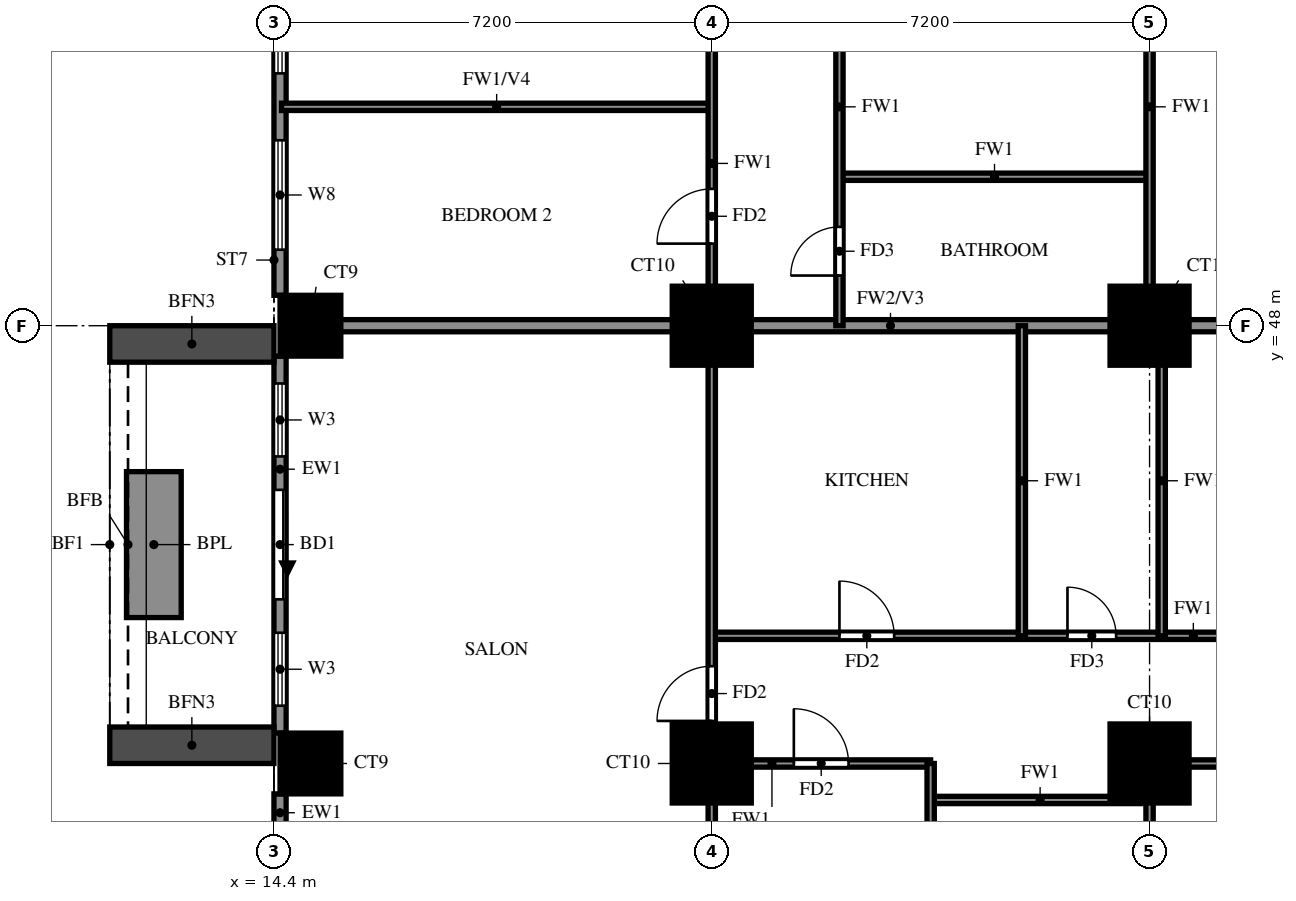
"""IFC4 building model, lengths in metres.
Left out: names, types, materials, properties, quantities, classifications, styles, units other than length and angle.
Written with IfcOpenShell. Run it as: python <this file> out.ifc"""

import sys

from ifc_helpers import new_model, si_unit, direction, frame, frame_2d, origin, origin_2d, place, context, subcontext, project, spatial, rectangle, extrude, source, transform, mapped, element, fill, save


model = new_model("IFC4")
c1 = context("Model", 3, precision=1e-05, world=origin(), true_north=direction((0.0, 1.0)))
c2 = subcontext(c1, "Body", "Model", "MODEL_VIEW")
j1 = project(units=[si_unit("LENGTHUNIT", "METRE"), si_unit("PLANEANGLEUNIT", "RADIAN")], contexts=[c1])
p1 = place(None, origin())
s1 = spatial("IfcSite", under=j1, at=p1, CompositionType="ELEMENT")
p2 = place(p1, origin())
s2 = spatial("IfcBuilding", under=s1, at=p2, CompositionType="ELEMENT")
p3 = place(p2, frame((0.0, 0.0, 90.0)))
s3 = spatial("IfcBuildingStorey", under=s2, at=p3, CompositionType="ELEMENT", Elevation=90.0)
m1 = source(origin(), c2, "Body", "SweptSolid", [
    extrude(rectangle(XDim=1.0, YDim=1.0, at=origin_2d()), origin(), (0.0, 0.0, 1.0), 3.18),
])
p4 = place(p3, frame((15.0, 40.8, 0.0), z_axis=(0.0, 0.0, 1.0), x_axis=(1.0, 0.0, 0.0)))
e1 = element("IfcColumn", 1, at=p4, inside=s3, PredefinedType="COLUMN", context=c2, shape_type="MappedRepresentation", body=[
    mapped(m1, transform((0.0, 0.0, 0.0))),
])
m2 = source(origin(), c2, "Body", "SweptSolid", [
    extrude(rectangle(XDim=1.3, YDim=1.3, at=origin_2d()), origin(), (0.0, 0.0, 1.0), 3.18),
])
for number, where, z_axis, x_axis in (
    (2, (21.6, 40.8, 0.0), (0.0, 0.0, 1.0), (1.0, 0.0, 0.0)),
    (3, (28.8, 40.8, 0.0), (0.0, 0.0, 1.0), (1.0, 0.0, 0.0)),
):
    element("IfcColumn", number, at=place(p3, frame(where, z_axis=z_axis, x_axis=x_axis)), inside=s3, PredefinedType="COLUMN", context=c2, shape_type="MappedRepresentation", body=[
        mapped(m2, transform((0.0, 0.0, 0.0))),
    ])
p5 = place(p3, frame((15.0, 48.0, 0.0), z_axis=(0.0, 0.0, 1.0), x_axis=(1.0, 0.0, 0.0)))
e4 = element("IfcColumn", 4, at=p5, inside=s3, PredefinedType="COLUMN", context=c2, shape_type="MappedRepresentation", body=[
    mapped(m1, transform((0.0, 0.0, 0.0))),
])
for number, where, z_axis, x_axis in (
    (5, (21.6, 48.0, 0.0), (0.0, 0.0, 1.0), (1.0, 0.0, 0.0)),
    (6, (28.8, 48.0, 0.0), (0.0, 0.0, 1.0), (1.0, 0.0, 0.0)),
):
    element("IfcColumn", number, at=place(p3, frame(where, z_axis=z_axis, x_axis=x_axis)), inside=s3, PredefinedType="COLUMN", context=c2, shape_type="MappedRepresentation", body=[
        mapped(m2, transform((0.0, 0.0, 0.0))),
    ])
p6 = place(p3, frame((14.5, 54.7, 0.0), z_axis=(0.0, 0.0, 1.0), x_axis=(0.0, -1.0, 0.0)))
e7 = element("IfcWall", 7, at=p6, inside=s3, PredefinedType="SOLIDWALL", context=c2, shape_type="SweptSolid", body=[
    extrude(rectangle(XDim=6.2, YDim=0.2, at=frame_2d((3.1, 0.0))), origin(), (0.0, 0.0, 1.0), 3.18),
])
p7 = place(p6, frame((3.65, 0.0, 0.6)))
e8 = element("IfcOpeningElement", 8, at=p7, cuts=e7, PredefinedType="OPENING", context=c2, shape_type="SweptSolid", body=[
    extrude(rectangle(XDim=1.8, YDim=2.4, at=frame_2d((0.9, 1.2))), frame((0.0, 0.11, 0.0), z_axis=(0.0, -1.0, 0.0), x_axis=(1.0, 0.0, 0.0)), (0.0, 0.0, 1.0), 0.22),
])
p8 = place(p6, frame((0.75, 0.0, 0.6)))
e9 = element("IfcOpeningElement", 9, at=p8, cuts=e7, PredefinedType="OPENING", context=c2, shape_type="SweptSolid", body=[
    extrude(rectangle(XDim=1.8, YDim=2.4, at=frame_2d((0.9, 1.2))), frame((0.0, 0.11, 0.0), z_axis=(0.0, -1.0, 0.0), x_axis=(1.0, 0.0, 0.0)), (0.0, 0.0, 1.0), 0.22),
])
p9 = place(p3, frame((14.5, 47.5, 0.0), z_axis=(0.0, 0.0, 1.0), x_axis=(0.0, -1.0, 0.0)))
e10 = element("IfcWall", 10, at=p9, inside=s3, PredefinedType="SOLIDWALL", context=c2, shape_type="SweptSolid", body=[
    extrude(rectangle(XDim=6.2, YDim=0.2, at=frame_2d((3.1, 0.0))), origin(), (0.0, 0.0, 1.0), 3.18),
])
p10 = place(p9, frame((2.2, 0.0, 0.0)))
e11 = element("IfcOpeningElement", 11, at=p10, cuts=e10, PredefinedType="OPENING", context=c2, shape_type="SweptSolid", body=[
    extrude(rectangle(XDim=1.8, YDim=2.4, at=frame_2d((0.9, 1.2))), frame((0.0, 0.11, 0.0), z_axis=(0.0, -1.0, 0.0), x_axis=(1.0, 0.0, 0.0)), (0.0, 0.0, 1.0), 0.22),
])
p11 = place(p9, frame((0.45, 0.0, 0.6)))
e12 = element("IfcOpeningElement", 12, at=p11, cuts=e10, PredefinedType="OPENING", context=c2, shape_type="SweptSolid", body=[
    extrude(rectangle(XDim=1.2, YDim=2.4, at=frame_2d((0.6, 1.2))), frame((0.0, 0.11, 0.0), z_axis=(0.0, -1.0, 0.0), x_axis=(1.0, 0.0, 0.0)), (0.0, 0.0, 1.0), 0.22),
])
p12 = place(p9, frame((4.55, 0.0, 0.6)))
e13 = element("IfcOpeningElement", 13, at=p12, cuts=e10, PredefinedType="OPENING", context=c2, shape_type="SweptSolid", body=[
    extrude(rectangle(XDim=1.2, YDim=2.4, at=frame_2d((0.6, 1.2))), frame((0.0, 0.11, 0.0), z_axis=(0.0, -1.0, 0.0), x_axis=(1.0, 0.0, 0.0)), (0.0, 0.0, 1.0), 0.22),
])
p13 = place(p3, frame((14.5, 40.3, 0.0), z_axis=(0.0, 0.0, 1.0), x_axis=(0.0, -1.0, 0.0)))
e14 = element("IfcWall", 14, at=p13, inside=s3, PredefinedType="SOLIDWALL", context=c2, shape_type="SweptSolid", body=[
    extrude(rectangle(XDim=3.1, YDim=0.2, at=frame_2d((1.55, 0.0))), origin(), (0.0, 0.0, 1.0), 3.18),
])
p14 = place(p13, frame((0.65, 0.0, 0.6)))
e15 = element("IfcOpeningElement", 15, at=p14, cuts=e14, PredefinedType="OPENING", context=c2, shape_type="SweptSolid", body=[
    extrude(rectangle(XDim=1.8, YDim=2.4, at=frame_2d((0.9, 1.2))), frame((0.0, 0.11, 0.0), z_axis=(0.0, -1.0, 0.0), x_axis=(1.0, 0.0, 0.0)), (0.0, 0.0, 1.0), 0.22),
])
for number, where, z_axis, x_axis in (
    (16, (14.4, 47.7, 0.0), (0.0, 0.0, 1.0), (-1.0, 0.0, 0.0)),
    (17, (14.4, 41.1, 0.0), (0.0, 0.0, 1.0), (-1.0, 0.0, 0.0)),
):
    element("IfcWall", number, at=place(p3, frame(where, z_axis=z_axis, x_axis=x_axis)), inside=s3, PredefinedType="SOLIDWALL", context=c2, shape_type="SweptSolid", body=[
        extrude(rectangle(XDim=2.7, YDim=0.6, at=frame_2d((1.35, 0.0))), origin(), (0.0, 0.0, 1.0), 2.85),
    ])
p15 = place(p3, frame((12.425, 45.6, 0.0), z_axis=(0.0, 0.0, 1.0), x_axis=(0.0, -1.0, 0.0)))
e18 = element("IfcWall", 18, at=p15, inside=s3, PredefinedType="SOLIDWALL", context=c2, shape_type="SweptSolid", body=[
    extrude(rectangle(XDim=2.4, YDim=0.9, at=frame_2d((1.2, 0.0))), origin(), (0.0, 0.0, 1.0), 0.9),
])
p16 = place(p3, frame((14.525, 48.0, 0.0), z_axis=(0.0, 0.0, 1.0), x_axis=(1.0, 0.0, 0.0)))
e19 = element("IfcWall", 19, at=p16, inside=s3, PredefinedType="SOLIDWALL", context=c2, shape_type="SweptSolid", body=[
    extrude(rectangle(XDim=19.075, YDim=0.2, at=frame_2d((9.538, 0.0))), origin(), (0.0, 0.0, 1.0), 3.18),
])
p17 = place(p3, frame((25.2, 40.2, 0.0), z_axis=(0.0, 0.0, 1.0), x_axis=(1.0, 0.0, 0.0)))
e20 = element("IfcWall", 20, at=p17, inside=s3, PredefinedType="PARTITIONING", context=c2, shape_type="SweptSolid", body=[
    extrude(rectangle(XDim=3.6, YDim=0.12, at=frame_2d((1.8, 0.0))), origin(), (0.0, 0.0, 1.0), 3.18),
])
p18 = place(p3, frame((21.6, 40.8, 0.0), z_axis=(0.0, 0.0, 1.0), x_axis=(1.0, 0.0, 0.0)))
e21 = element("IfcWall", 21, at=p18, inside=s3, PredefinedType="PARTITIONING", context=c2, shape_type="SweptSolid", body=[
    extrude(rectangle(XDim=3.6, YDim=0.12, at=frame_2d((1.8, 0.0))), origin(), (0.0, 0.0, 1.0), 3.18),
])
p19 = place(p18, frame((1.35, 0.0, 0.0)))
e22 = element("IfcOpeningElement", 22, at=p19, cuts=e21, PredefinedType="OPENING", context=c2, shape_type="SweptSolid", body=[
    extrude(rectangle(XDim=0.9, YDim=2.1, at=frame_2d((0.45, 1.05))), frame((0.0, 0.07, 0.0), z_axis=(0.0, -1.0, 0.0), x_axis=(1.0, 0.0, 0.0)), (0.0, 0.0, 1.0), 0.14),
])
p20 = place(p3, frame((28.8, 40.8, 0.0), z_axis=(0.0, 0.0, 1.0), x_axis=(1.0, 0.0, 0.0)))
e23 = element("IfcWall", 23, at=p20, inside=s3, PredefinedType="PARTITIONING", context=c2, shape_type="SweptSolid", body=[
    extrude(rectangle(XDim=12.0, YDim=0.12, at=frame_2d((6.0, 0.0))), origin(), (0.0, 0.0, 1.0), 3.18),
])
p21 = place(p20, frame((1.35, 0.0, 0.0)))
e24 = element("IfcOpeningElement", 24, at=p21, cuts=e23, PredefinedType="OPENING", context=c2, shape_type="SweptSolid", body=[
    extrude(rectangle(XDim=0.9, YDim=2.1, at=frame_2d((0.45, 1.05))), frame((0.0, 0.07, 0.0), z_axis=(0.0, -1.0, 0.0), x_axis=(1.0, 0.0, 0.0)), (0.0, 0.0, 1.0), 0.14),
])
p22 = place(p20, frame((4.95, 0.0, 0.0)))
e25 = element("IfcOpeningElement", 25, at=p22, cuts=e23, PredefinedType="OPENING", context=c2, shape_type="SweptSolid", body=[
    extrude(rectangle(XDim=0.9, YDim=2.1, at=frame_2d((0.45, 1.05))), frame((0.0, 0.07, 0.0), z_axis=(0.0, -1.0, 0.0), x_axis=(1.0, 0.0, 0.0)), (0.0, 0.0, 1.0), 0.14),
])
p23 = place(p20, frame((9.15, 0.0, 0.0)))
e26 = element("IfcOpeningElement", 26, at=p23, cuts=e23, PredefinedType="OPENING", context=c2, shape_type="SweptSolid", body=[
    extrude(rectangle(XDim=0.9, YDim=2.1, at=frame_2d((0.45, 1.05))), frame((0.0, 0.07, 0.0), z_axis=(0.0, -1.0, 0.0), x_axis=(1.0, 0.0, 0.0)), (0.0, 0.0, 1.0), 0.14),
])
p24 = place(p3, frame((21.6, 42.9, 0.0), z_axis=(0.0, 0.0, 1.0), x_axis=(1.0, 0.0, 0.0)))
e27 = element("IfcWall", 27, at=p24, inside=s3, PredefinedType="PARTITIONING", context=c2, shape_type="SweptSolid", body=[
    extrude(rectangle(XDim=14.4, YDim=0.12, at=frame_2d((7.2, 0.0))), origin(), (0.0, 0.0, 1.0), 3.18),
])
p25 = place(p24, frame((2.1, 0.0, 0.0)))
e28 = element("IfcOpeningElement", 28, at=p25, cuts=e27, PredefinedType="OPENING", context=c2, shape_type="SweptSolid", body=[
    extrude(rectangle(XDim=0.9, YDim=2.1, at=frame_2d((0.45, 1.05))), frame((0.0, 0.07, 0.0), z_axis=(0.0, -1.0, 0.0), x_axis=(1.0, 0.0, 0.0)), (0.0, 0.0, 1.0), 0.14),
])
p26 = place(p24, frame((5.85, 0.0, 0.0)))
e29 = element("IfcOpeningElement", 29, at=p26, cuts=e27, PredefinedType="OPENING", context=c2, shape_type="SweptSolid", body=[
    extrude(rectangle(XDim=0.8, YDim=2.1, at=frame_2d((0.4, 1.05))), frame((0.0, 0.07, 0.0), z_axis=(0.0, -1.0, 0.0), x_axis=(1.0, 0.0, 0.0)), (0.0, 0.0, 1.0), 0.14),
])
p27 = place(p24, frame((9.25, 0.0, 0.0)))
e30 = element("IfcOpeningElement", 30, at=p27, cuts=e27, PredefinedType="OPENING", context=c2, shape_type="SweptSolid", body=[
    extrude(rectangle(XDim=0.9, YDim=2.1, at=frame_2d((0.45, 1.05))), frame((0.0, 0.07, 0.0), z_axis=(0.0, -1.0, 0.0), x_axis=(1.0, 0.0, 0.0)), (0.0, 0.0, 1.0), 0.14),
])
p28 = place(p3, frame((23.7, 50.45, 0.0), z_axis=(0.0, 0.0, 1.0), x_axis=(1.0, 0.0, 0.0)))
e31 = element("IfcWall", 31, at=p28, inside=s3, PredefinedType="PARTITIONING", context=c2, shape_type="SweptSolid", body=[
    extrude(rectangle(XDim=5.1, YDim=0.12, at=frame_2d((2.55, 0.0))), origin(), (0.0, 0.0, 1.0), 3.18),
])
p29 = place(p3, frame((14.525, 51.6, 0.0), z_axis=(0.0, 0.0, 1.0), x_axis=(1.0, 0.0, 0.0)))
e32 = element("IfcWall", 32, at=p29, inside=s3, PredefinedType="PARTITIONING", context=c2, shape_type="SweptSolid", body=[
    extrude(rectangle(XDim=7.075, YDim=0.12, at=frame_2d((3.538, 0.0))), origin(), (0.0, 0.0, 1.0), 2.28),
])
p30 = place(p3, frame((21.6, 33.725, 0.0), z_axis=(0.0, 0.0, 1.0), x_axis=(0.0, 1.0, 0.0)))
e33 = element("IfcWall", 33, at=p30, inside=s3, PredefinedType="PARTITIONING", context=c2, shape_type="SweptSolid", body=[
    extrude(rectangle(XDim=32.275, YDim=0.12, at=frame_2d((16.137, 0.0))), origin(), (0.0, 0.0, 1.0), 3.18),
])
p31 = place(p30, frame((7.775, 0.0, 0.0)))
e34 = element("IfcOpeningElement", 34, at=p31, cuts=e33, PredefinedType="OPENING", context=c2, shape_type="SweptSolid", body=[
    extrude(rectangle(XDim=0.9, YDim=2.1, at=frame_2d((0.45, 1.05))), frame((0.0, 0.07, 0.0), z_axis=(0.0, -1.0, 0.0), x_axis=(1.0, 0.0, 0.0)), (0.0, 0.0, 1.0), 0.14),
])
p32 = place(p30, frame((15.625, 0.0, 0.0)))
e35 = element("IfcOpeningElement", 35, at=p32, cuts=e33, PredefinedType="OPENING", context=c2, shape_type="SweptSolid", body=[
    extrude(rectangle(XDim=0.9, YDim=2.1, at=frame_2d((0.45, 1.05))), frame((0.0, 0.07, 0.0), z_axis=(0.0, -1.0, 0.0), x_axis=(1.0, 0.0, 0.0)), (0.0, 0.0, 1.0), 0.14),
])
p33 = place(p30, frame((22.225, 0.0, 0.0)))
e36 = element("IfcOpeningElement", 36, at=p33, cuts=e33, PredefinedType="OPENING", context=c2, shape_type="SweptSolid", body=[
    extrude(rectangle(XDim=1.5, YDim=2.1, at=frame_2d((0.75, 1.05))), frame((0.0, 0.07, 0.0), z_axis=(0.0, -1.0, 0.0), x_axis=(1.0, 0.0, 0.0)), (0.0, 0.0, 1.0), 0.14),
])
p34 = place(p30, frame((26.425, 0.0, 0.0)))
e37 = element("IfcOpeningElement", 37, at=p34, cuts=e33, PredefinedType="OPENING", context=c2, shape_type="SweptSolid", body=[
    extrude(rectangle(XDim=0.9, YDim=2.1, at=frame_2d((0.45, 1.05))), frame((0.0, 0.07, 0.0), z_axis=(0.0, -1.0, 0.0), x_axis=(1.0, 0.0, 0.0)), (0.0, 0.0, 1.0), 0.14),
])
p35 = place(p30, frame((30.025, 0.0, 0.0)))
e38 = element("IfcOpeningElement", 38, at=p35, cuts=e33, PredefinedType="OPENING", context=c2, shape_type="SweptSolid", body=[
    extrude(rectangle(XDim=0.9, YDim=2.1, at=frame_2d((0.45, 1.05))), frame((0.0, 0.07, 0.0), z_axis=(0.0, -1.0, 0.0), x_axis=(1.0, 0.0, 0.0)), (0.0, 0.0, 1.0), 0.14),
])
p36 = place(p3, frame((23.7, 48.0, 0.0), z_axis=(0.0, 0.0, 1.0), x_axis=(0.0, 1.0, 0.0)))
e39 = element("IfcWall", 39, at=p36, inside=s3, PredefinedType="PARTITIONING", context=c2, shape_type="SweptSolid", body=[
    extrude(rectangle(XDim=7.2, YDim=0.12, at=frame_2d((3.6, 0.0))), origin(), (0.0, 0.0, 1.0), 3.18),
])
p37 = place(p36, frame((0.825, 0.0, 0.0)))
e40 = element("IfcOpeningElement", 40, at=p37, cuts=e39, PredefinedType="OPENING", context=c2, shape_type="SweptSolid", body=[
    extrude(rectangle(XDim=0.8, YDim=2.1, at=frame_2d((0.4, 1.05))), frame((0.0, 0.07, 0.0), z_axis=(0.0, -1.0, 0.0), x_axis=(1.0, 0.0, 0.0)), (0.0, 0.0, 1.0), 0.14),
])
p38 = place(p3, frame((25.2, 33.725, 0.0), z_axis=(0.0, 0.0, 1.0), x_axis=(0.0, 1.0, 0.0)))
e41 = element("IfcWall", 41, at=p38, inside=s3, PredefinedType="PARTITIONING", context=c2, shape_type="SweptSolid", body=[
    extrude(rectangle(XDim=7.075, YDim=0.12, at=frame_2d((3.538, 0.0))), origin(), (0.0, 0.0, 1.0), 2.28),
])
p39 = place(p38, frame((2.837, 0.0, 0.0)))
e42 = element("IfcOpeningElement", 42, at=p39, cuts=e41, PredefinedType="OPENING", context=c2, shape_type="SweptSolid", body=[
    extrude(rectangle(XDim=0.8, YDim=2.1, at=frame_2d((0.4, 1.05))), frame((0.0, 0.07, 0.0), z_axis=(0.0, -1.0, 0.0), x_axis=(1.0, 0.0, 0.0)), (0.0, 0.0, 1.0), 0.14),
])
p40 = place(p3, frame((26.7, 42.9, 0.0), z_axis=(0.0, 0.0, 1.0), x_axis=(0.0, 1.0, 0.0)))
e43 = element("IfcWall", 43, at=p40, inside=s3, PredefinedType="PARTITIONING", context=c2, shape_type="SweptSolid", body=[
    extrude(rectangle(XDim=5.1, YDim=0.12, at=frame_2d((2.55, 0.0))), origin(), (0.0, 0.0, 1.0), 3.18),
])
p41 = place(p3, frame((28.8, 33.725, 0.0), z_axis=(0.0, 0.0, 1.0), x_axis=(0.0, 1.0, 0.0)))
e44 = element("IfcWall", 44, at=p41, inside=s3, PredefinedType="PARTITIONING", context=c2, shape_type="SweptSolid", body=[
    extrude(rectangle(XDim=7.075, YDim=0.12, at=frame_2d((3.538, 0.0))), origin(), (0.0, 0.0, 1.0), 3.18),
])
p42 = place(p3, frame((28.8, 48.0, 0.0), z_axis=(0.0, 0.0, 1.0), x_axis=(0.0, 1.0, 0.0)))
e45 = element("IfcWall", 45, at=p42, inside=s3, PredefinedType="PARTITIONING", context=c2, shape_type="SweptSolid", body=[
    extrude(rectangle(XDim=7.2, YDim=0.12, at=frame_2d((3.6, 0.0))), origin(), (0.0, 0.0, 1.0), 3.18),
])
p43 = place(p3, frame((29.0, 42.9, 0.0), z_axis=(0.0, 0.0, 1.0), x_axis=(0.0, 1.0, 0.0)))
e46 = element("IfcWall", 46, at=p43, inside=s3, PredefinedType="PARTITIONING", context=c2, shape_type="SweptSolid", body=[
    extrude(rectangle(XDim=5.1, YDim=0.12, at=frame_2d((2.55, 0.0))), origin(), (0.0, 0.0, 1.0), 3.18),
])
p44 = place(p7, origin())
e47 = element("IfcWindow", 47, at=p44, inside=s3, PartitioningType="DOUBLE_PANEL_VERTICAL", PredefinedType="WINDOW", context=c2, shape_type="SweptSolid", body=[
    extrude(rectangle(XDim=1.8, YDim=2.4, at=frame_2d((0.9, 1.2))), frame((0.0, 0.03, 0.0), z_axis=(0.0, -1.0, 0.0), x_axis=(1.0, 0.0, 0.0)), (0.0, 0.0, 1.0), 0.06),
])
fill(e8, e47)
p45 = place(p8, origin())
e48 = element("IfcWindow", 48, at=p45, inside=s3, PartitioningType="DOUBLE_PANEL_VERTICAL", PredefinedType="WINDOW", context=c2, shape_type="SweptSolid", body=[
    extrude(rectangle(XDim=1.8, YDim=2.4, at=frame_2d((0.9, 1.2))), frame((0.0, 0.03, 0.0), z_axis=(0.0, -1.0, 0.0), x_axis=(1.0, 0.0, 0.0)), (0.0, 0.0, 1.0), 0.06),
])
fill(e9, e48)
p46 = place(p10, origin())
e49 = element("IfcDoor", 49, at=p46, inside=s3, OperationType="DOUBLE_DOOR_SLIDING", PredefinedType="DOOR", context=c2, shape_type="SweptSolid", body=[
    extrude(rectangle(XDim=1.8, YDim=2.4, at=frame_2d((0.9, 1.2))), frame((0.0, 0.025, 0.0), z_axis=(0.0, -1.0, 0.0), x_axis=(1.0, 0.0, 0.0)), (0.0, 0.0, 1.0), 0.05),
])
fill(e11, e49)
p47 = place(p11, origin())
e50 = element("IfcWindow", 50, at=p47, inside=s3, PartitioningType="SINGLE_PANEL", PredefinedType="WINDOW", context=c2, shape_type="SweptSolid", body=[
    extrude(rectangle(XDim=1.2, YDim=2.4, at=frame_2d((0.6, 1.2))), frame((0.0, 0.03, 0.0), z_axis=(0.0, -1.0, 0.0), x_axis=(1.0, 0.0, 0.0)), (0.0, 0.0, 1.0), 0.06),
])
fill(e12, e50)
p48 = place(p12, origin())
e51 = element("IfcWindow", 51, at=p48, inside=s3, PartitioningType="SINGLE_PANEL", PredefinedType="WINDOW", context=c2, shape_type="SweptSolid", body=[
    extrude(rectangle(XDim=1.2, YDim=2.4, at=frame_2d((0.6, 1.2))), frame((0.0, 0.03, 0.0), z_axis=(0.0, -1.0, 0.0), x_axis=(1.0, 0.0, 0.0)), (0.0, 0.0, 1.0), 0.06),
])
fill(e13, e51)
p49 = place(p31, origin())
e52 = element("IfcDoor", 52, at=p49, inside=s3, OperationType="SINGLE_SWING_LEFT", PredefinedType="DOOR", context=c2, shape_type="SweptSolid", body=[
    extrude(rectangle(XDim=0.9, YDim=2.1, at=frame_2d((0.45, 1.05))), frame((0.0, 0.025, 0.0), z_axis=(0.0, -1.0, 0.0), x_axis=(1.0, 0.0, 0.0)), (0.0, 0.0, 1.0), 0.05),
])
fill(e34, e52)
p50 = place(p19, origin())
e53 = element("IfcDoor", 53, at=p50, inside=s3, OperationType="SINGLE_SWING_LEFT", PredefinedType="DOOR", context=c2, shape_type="SweptSolid", body=[
    extrude(rectangle(XDim=0.9, YDim=2.1, at=frame_2d((0.45, 1.05))), frame((0.0, 0.025, 0.0), z_axis=(0.0, -1.0, 0.0), x_axis=(1.0, 0.0, 0.0)), (0.0, 0.0, 1.0), 0.05),
])
fill(e22, e53)
p51 = place(p25, origin())
e54 = element("IfcDoor", 54, at=p51, inside=s3, OperationType="SINGLE_SWING_RIGHT", PredefinedType="DOOR", context=c2, shape_type="SweptSolid", body=[
    extrude(rectangle(XDim=0.9, YDim=2.1, at=frame_2d((0.45, 1.05))), frame((0.0, 0.025, 0.0), z_axis=(0.0, -1.0, 0.0), x_axis=(1.0, 0.0, 0.0)), (0.0, 0.0, 1.0), 0.05),
])
fill(e28, e54)
p52 = place(p26, origin())
e55 = element("IfcDoor", 55, at=p52, inside=s3, OperationType="SINGLE_SWING_LEFT", PredefinedType="DOOR", context=c2, shape_type="SweptSolid", body=[
    extrude(rectangle(XDim=0.8, YDim=2.1, at=frame_2d((0.4, 1.05))), frame((0.0, 0.025, 0.0), z_axis=(0.0, -1.0, 0.0), x_axis=(1.0, 0.0, 0.0)), (0.0, 0.0, 1.0), 0.05),
])
fill(e29, e55)
p53 = place(p32, origin())
e56 = element("IfcDoor", 56, at=p53, inside=s3, OperationType="SINGLE_SWING_RIGHT", PredefinedType="DOOR", context=c2, shape_type="SweptSolid", body=[
    extrude(rectangle(XDim=0.9, YDim=2.1, at=frame_2d((0.45, 1.05))), frame((0.0, 0.025, 0.0), z_axis=(0.0, -1.0, 0.0), x_axis=(1.0, 0.0, 0.0)), (0.0, 0.0, 1.0), 0.05),
])
fill(e35, e56)
p54 = place(p37, origin())
e57 = element("IfcDoor", 57, at=p54, inside=s3, OperationType="SINGLE_SWING_RIGHT", PredefinedType="DOOR", context=c2, shape_type="SweptSolid", body=[
    extrude(rectangle(XDim=0.8, YDim=2.1, at=frame_2d((0.4, 1.05))), frame((0.0, 0.025, 0.0), z_axis=(0.0, -1.0, 0.0), x_axis=(1.0, 0.0, 0.0)), (0.0, 0.0, 1.0), 0.05),
])
fill(e40, e57)
save(model, sys.argv[1])
